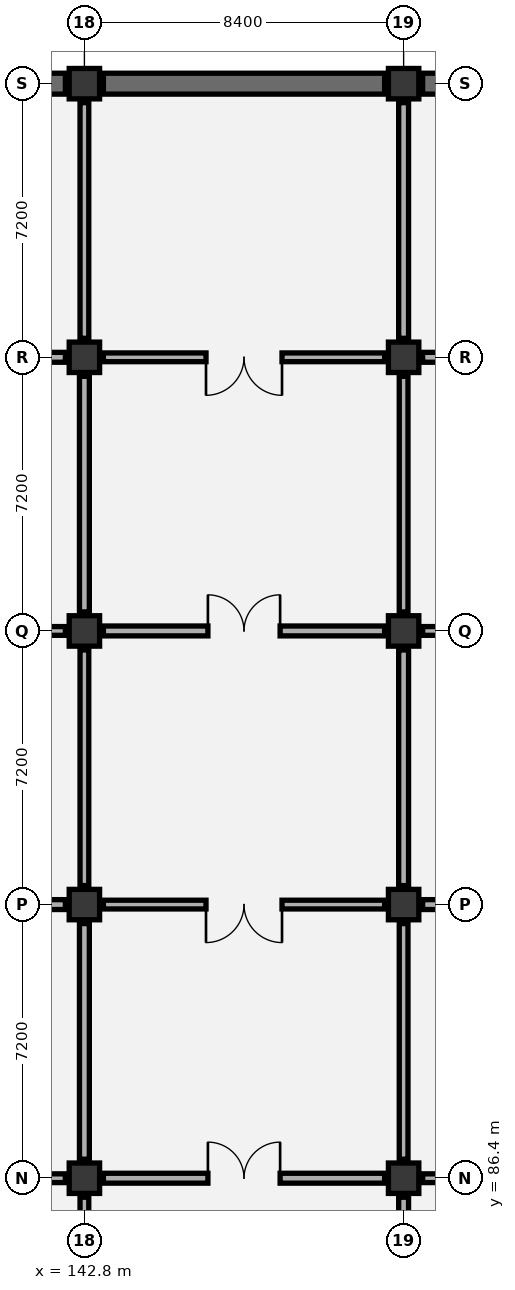
"""IFC4 building model, lengths in metres.
Left out: names, types, materials, properties, quantities, classifications, styles, units other than length and angle.
Written with IfcOpenShell. Run it as: python <this file> out.ifc"""

import sys

from ifc_helpers import new_model, si_unit, direction, frame, frame_2d, origin, origin_2d, place, context, subcontext, project, spatial, rectangle, extrude, element, fill, save


model = new_model("IFC4")
c1 = context("Model", 3, precision=1e-05, world=origin(), true_north=direction((0.0, 1.0)))
c2 = subcontext(c1, "Body", "Model", "MODEL_VIEW")
j1 = project(units=[si_unit("LENGTHUNIT", "METRE"), si_unit("PLANEANGLEUNIT", "RADIAN")], contexts=[c1])
p1 = place(None, origin())
s1 = spatial("IfcSite", under=j1, at=p1, CompositionType="ELEMENT")
p2 = place(p1, origin())
s2 = spatial("IfcBuilding", under=s1, at=p2, CompositionType="ELEMENT")
p3 = place(p2, frame((0.0, 0.0, -9.6)))
s3 = spatial("IfcBuildingStorey", under=s2, at=p3, CompositionType="ELEMENT", Elevation=-9.6)
for number, where, z_axis, x_axis in (
    (1, (142.8, 86.4, 0.0), (0.0, 0.0, 1.0), (1.0, 0.0, 0.0)),
    (2, (142.8, 93.6, 0.0), (0.0, 0.0, 1.0), (1.0, 0.0, 0.0)),
    (3, (142.8, 100.8, 0.0), (0.0, 0.0, 1.0), (1.0, 0.0, 0.0)),
    (4, (142.8, 108.0, 0.0), (0.0, 0.0, 1.0), (1.0, 0.0, 0.0)),
    (5, (142.8, 115.2, 0.0), (0.0, 0.0, 1.0), (1.0, 0.0, 0.0)),
    (6, (151.2, 86.4, 0.0), (0.0, 0.0, 1.0), (1.0, 0.0, 0.0)),
    (7, (151.2, 93.6, 0.0), (0.0, 0.0, 1.0), (1.0, 0.0, 0.0)),
    (8, (151.2, 100.8, 0.0), (0.0, 0.0, 1.0), (1.0, 0.0, 0.0)),
    (9, (151.2, 108.0, 0.0), (0.0, 0.0, 1.0), (1.0, 0.0, 0.0)),
    (10, (151.2, 115.2, 0.0), (0.0, 0.0, 1.0), (1.0, 0.0, 0.0)),
):
    element("IfcColumn", number, at=place(p3, frame(where, z_axis=z_axis, x_axis=x_axis)), inside=s3, PredefinedType="COLUMN", context=c2, shape_type="SweptSolid", body=[
        extrude(rectangle(XDim=0.8, YDim=0.8, at=origin_2d()), origin(), (0.0, 0.0, 1.0), 4.8),
    ])
p4 = place(p3, frame((134.9, 115.2, 0.0), z_axis=(0.0, 0.0, 1.0), x_axis=(1.0, 0.0, 0.0)))
e11 = element("IfcWall", 11, at=p4, inside=s3, PredefinedType="USERDEFINED", context=c2, shape_type="SweptSolid", body=[
    extrude(rectangle(XDim=7.4, YDim=0.55, at=frame_2d((3.7, 0.0))), origin(), (0.0, 0.0, 1.0), 4.4),
])
p5 = place(p3, frame((143.3, 115.2, 0.0), z_axis=(0.0, 0.0, 1.0), x_axis=(1.0, 0.0, 0.0)))
e12 = element("IfcWall", 12, at=p5, inside=s3, PredefinedType="USERDEFINED", context=c2, shape_type="SweptSolid", body=[
    extrude(rectangle(XDim=7.4, YDim=0.55, at=frame_2d((3.7, 0.0))), origin(), (0.0, 0.0, 1.0), 4.4),
])
p6 = place(p3, frame((151.7, 115.2, 0.0), z_axis=(0.0, 0.0, 1.0), x_axis=(1.0, 0.0, 0.0)))
e13 = element("IfcWall", 13, at=p6, inside=s3, PredefinedType="USERDEFINED", context=c2, shape_type="SweptSolid", body=[
    extrude(rectangle(XDim=7.4, YDim=0.55, at=frame_2d((3.7, 0.0))), origin(), (0.0, 0.0, 1.0), 4.4),
])
p7 = place(p3, frame((142.8, 79.7, 0.0), z_axis=(0.0, 0.0, 1.0), x_axis=(0.0, 1.0, 0.0)))
e14 = element("IfcWall", 14, at=p7, inside=s3, PredefinedType="PARTITIONING", context=c2, shape_type="SweptSolid", body=[
    extrude(rectangle(XDim=6.2, YDim=0.23, at=frame_2d((3.1, 0.0))), origin(), (0.0, 0.0, 1.0), 3.595),
])
p8 = place(p7, frame((2.1, 0.0, 0.0)))
e15 = element("IfcOpeningElement", 15, at=p8, cuts=e14, PredefinedType="OPENING", context=c2, shape_type="SweptSolid", body=[
    extrude(rectangle(XDim=2.0, YDim=2.35, at=frame_2d((1.0, 1.175))), frame((0.0, 0.125, 0.0), z_axis=(0.0, -1.0, 0.0), x_axis=(1.0, 0.0, 0.0)), (0.0, 0.0, 1.0), 0.25),
])
p9 = place(p3, frame((134.9, 86.4, 0.0), z_axis=(0.0, 0.0, 1.0), x_axis=(1.0, 0.0, 0.0)))
e16 = element("IfcWall", 16, at=p9, inside=s3, PredefinedType="PARTITIONING", context=c2, shape_type="SweptSolid", body=[
    extrude(rectangle(XDim=7.4, YDim=0.23, at=frame_2d((3.7, 0.0))), origin(), (0.0, 0.0, 1.0), 3.495),
])
p10 = place(p9, frame((2.75, 0.0, 0.0)))
e17 = element("IfcOpeningElement", 17, at=p10, cuts=e16, PredefinedType="OPENING", context=c2, shape_type="SweptSolid", body=[
    extrude(rectangle(XDim=1.9, YDim=2.3, at=frame_2d((0.95, 1.15))), frame((0.0, 0.125, 0.0), z_axis=(0.0, -1.0, 0.0), x_axis=(1.0, 0.0, 0.0)), (0.0, 0.0, 1.0), 0.25),
])
p11 = place(p3, frame((142.8, 86.9, 0.0), z_axis=(0.0, 0.0, 1.0), x_axis=(0.0, 1.0, 0.0)))
e18 = element("IfcWall", 18, at=p11, inside=s3, PredefinedType="PARTITIONING", context=c2, shape_type="SweptSolid", body=[
    extrude(rectangle(XDim=6.2, YDim=0.26, at=frame_2d((3.1, 0.0))), origin(), (0.0, 0.0, 1.0), 3.595),
])
p12 = place(p3, frame((134.9, 93.6, 0.0), z_axis=(0.0, 0.0, 1.0), x_axis=(1.0, 0.0, 0.0)))
e19 = element("IfcWall", 19, at=p12, inside=s3, PredefinedType="PARTITIONING", context=c2, shape_type="SweptSolid", body=[
    extrude(rectangle(XDim=7.4, YDim=0.26, at=frame_2d((3.7, 0.0))), origin(), (0.0, 0.0, 1.0), 3.495),
])
p13 = place(p12, frame((2.7, 0.0, 0.0)))
e20 = element("IfcOpeningElement", 20, at=p13, cuts=e19, PredefinedType="OPENING", context=c2, shape_type="SweptSolid", body=[
    extrude(rectangle(XDim=2.0, YDim=2.35, at=frame_2d((1.0, 1.175))), frame((0.0, 0.14, 0.0), z_axis=(0.0, -1.0, 0.0), x_axis=(1.0, 0.0, 0.0)), (0.0, 0.0, 1.0), 0.28),
])
p14 = place(p3, frame((142.8, 94.1, 0.0), z_axis=(0.0, 0.0, 1.0), x_axis=(0.0, 1.0, 0.0)))
e21 = element("IfcWall", 21, at=p14, inside=s3, PredefinedType="PARTITIONING", context=c2, shape_type="SweptSolid", body=[
    extrude(rectangle(XDim=6.2, YDim=0.23, at=frame_2d((3.1, 0.0))), origin(), (0.0, 0.0, 1.0), 3.595),
])
p15 = place(p3, frame((134.9, 100.8, 0.0), z_axis=(0.0, 0.0, 1.0), x_axis=(1.0, 0.0, 0.0)))
e22 = element("IfcWall", 22, at=p15, inside=s3, PredefinedType="PARTITIONING", context=c2, shape_type="SweptSolid", body=[
    extrude(rectangle(XDim=7.4, YDim=0.23, at=frame_2d((3.7, 0.0))), origin(), (0.0, 0.0, 1.0), 3.495),
])
p16 = place(p15, frame((2.75, 0.0, 0.0)))
e23 = element("IfcOpeningElement", 23, at=p16, cuts=e22, PredefinedType="OPENING", context=c2, shape_type="SweptSolid", body=[
    extrude(rectangle(XDim=1.9, YDim=2.3, at=frame_2d((0.95, 1.15))), frame((0.0, 0.125, 0.0), z_axis=(0.0, -1.0, 0.0), x_axis=(1.0, 0.0, 0.0)), (0.0, 0.0, 1.0), 0.25),
])
p17 = place(p3, frame((142.8, 101.3, 0.0), z_axis=(0.0, 0.0, 1.0), x_axis=(0.0, 1.0, 0.0)))
e24 = element("IfcWall", 24, at=p17, inside=s3, PredefinedType="PARTITIONING", context=c2, shape_type="SweptSolid", body=[
    extrude(rectangle(XDim=6.2, YDim=0.26, at=frame_2d((3.1, 0.0))), origin(), (0.0, 0.0, 1.0), 3.595),
])
p18 = place(p3, frame((134.9, 108.0, 0.0), z_axis=(0.0, 0.0, 1.0), x_axis=(1.0, 0.0, 0.0)))
e25 = element("IfcWall", 25, at=p18, inside=s3, PredefinedType="PARTITIONING", context=c2, shape_type="SweptSolid", body=[
    extrude(rectangle(XDim=7.4, YDim=0.26, at=frame_2d((3.7, 0.0))), origin(), (0.0, 0.0, 1.0), 3.495),
])
p19 = place(p18, frame((2.7, 0.0, 0.0)))
e26 = element("IfcOpeningElement", 26, at=p19, cuts=e25, PredefinedType="OPENING", context=c2, shape_type="SweptSolid", body=[
    extrude(rectangle(XDim=2.0, YDim=2.35, at=frame_2d((1.0, 1.175))), frame((0.0, 0.14, 0.0), z_axis=(0.0, -1.0, 0.0), x_axis=(1.0, 0.0, 0.0)), (0.0, 0.0, 1.0), 0.28),
])
p20 = place(p3, frame((142.8, 108.5, 0.0), z_axis=(0.0, 0.0, 1.0), x_axis=(0.0, 1.0, 0.0)))
e27 = element("IfcWall", 27, at=p20, inside=s3, PredefinedType="PARTITIONING", context=c2, shape_type="SweptSolid", body=[
    extrude(rectangle(XDim=6.2, YDim=0.23, at=frame_2d((3.1, 0.0))), origin(), (0.0, 0.0, 1.0), 3.595),
])
p21 = place(p3, frame((151.2, 79.7, 0.0), z_axis=(0.0, 0.0, 1.0), x_axis=(0.0, 1.0, 0.0)))
e28 = element("IfcWall", 28, at=p21, inside=s3, PredefinedType="PARTITIONING", context=c2, shape_type="SweptSolid", body=[
    extrude(rectangle(XDim=6.2, YDim=0.26, at=frame_2d((3.1, 0.0))), origin(), (0.0, 0.0, 1.0), 3.595),
])
p22 = place(p21, frame((2.1, 0.0, 0.0)))
e29 = element("IfcOpeningElement", 29, at=p22, cuts=e28, PredefinedType="OPENING", context=c2, shape_type="SweptSolid", body=[
    extrude(rectangle(XDim=2.0, YDim=2.35, at=frame_2d((1.0, 1.175))), frame((0.0, 0.14, 0.0), z_axis=(0.0, -1.0, 0.0), x_axis=(1.0, 0.0, 0.0)), (0.0, 0.0, 1.0), 0.28),
])
p23 = place(p3, frame((143.3, 86.4, 0.0), z_axis=(0.0, 0.0, 1.0), x_axis=(1.0, 0.0, 0.0)))
e30 = element("IfcWall", 30, at=p23, inside=s3, PredefinedType="PARTITIONING", context=c2, shape_type="SweptSolid", body=[
    extrude(rectangle(XDim=7.4, YDim=0.26, at=frame_2d((3.7, 0.0))), origin(), (0.0, 0.0, 1.0), 3.495),
])
p24 = place(p23, frame((2.75, 0.0, 0.0)))
e31 = element("IfcOpeningElement", 31, at=p24, cuts=e30, PredefinedType="OPENING", context=c2, shape_type="SweptSolid", body=[
    extrude(rectangle(XDim=1.9, YDim=2.3, at=frame_2d((0.95, 1.15))), frame((0.0, 0.14, 0.0), z_axis=(0.0, -1.0, 0.0), x_axis=(1.0, 0.0, 0.0)), (0.0, 0.0, 1.0), 0.28),
])
p25 = place(p3, frame((151.2, 86.9, 0.0), z_axis=(0.0, 0.0, 1.0), x_axis=(0.0, 1.0, 0.0)))
e32 = element("IfcWall", 32, at=p25, inside=s3, PredefinedType="PARTITIONING", context=c2, shape_type="SweptSolid", body=[
    extrude(rectangle(XDim=6.2, YDim=0.23, at=frame_2d((3.1, 0.0))), origin(), (0.0, 0.0, 1.0), 3.595),
])
p26 = place(p3, frame((143.3, 93.6, 0.0), z_axis=(0.0, 0.0, 1.0), x_axis=(1.0, 0.0, 0.0)))
e33 = element("IfcWall", 33, at=p26, inside=s3, PredefinedType="PARTITIONING", context=c2, shape_type="SweptSolid", body=[
    extrude(rectangle(XDim=7.4, YDim=0.23, at=frame_2d((3.7, 0.0))), origin(), (0.0, 0.0, 1.0), 3.495),
])
p27 = place(p26, frame((2.7, 0.0, 0.0)))
e34 = element("IfcOpeningElement", 34, at=p27, cuts=e33, PredefinedType="OPENING", context=c2, shape_type="SweptSolid", body=[
    extrude(rectangle(XDim=2.0, YDim=2.35, at=frame_2d((1.0, 1.175))), frame((0.0, 0.125, 0.0), z_axis=(0.0, -1.0, 0.0), x_axis=(1.0, 0.0, 0.0)), (0.0, 0.0, 1.0), 0.25),
])
p28 = place(p3, frame((151.2, 94.1, 0.0), z_axis=(0.0, 0.0, 1.0), x_axis=(0.0, 1.0, 0.0)))
e35 = element("IfcWall", 35, at=p28, inside=s3, PredefinedType="PARTITIONING", context=c2, shape_type="SweptSolid", body=[
    extrude(rectangle(XDim=6.2, YDim=0.26, at=frame_2d((3.1, 0.0))), origin(), (0.0, 0.0, 1.0), 3.595),
])
p29 = place(p3, frame((143.3, 100.8, 0.0), z_axis=(0.0, 0.0, 1.0), x_axis=(1.0, 0.0, 0.0)))
e36 = element("IfcWall", 36, at=p29, inside=s3, PredefinedType="PARTITIONING", context=c2, shape_type="SweptSolid", body=[
    extrude(rectangle(XDim=7.4, YDim=0.26, at=frame_2d((3.7, 0.0))), origin(), (0.0, 0.0, 1.0), 3.495),
])
p30 = place(p29, frame((2.75, 0.0, 0.0)))
e37 = element("IfcOpeningElement", 37, at=p30, cuts=e36, PredefinedType="OPENING", context=c2, shape_type="SweptSolid", body=[
    extrude(rectangle(XDim=1.9, YDim=2.3, at=frame_2d((0.95, 1.15))), frame((0.0, 0.14, 0.0), z_axis=(0.0, -1.0, 0.0), x_axis=(1.0, 0.0, 0.0)), (0.0, 0.0, 1.0), 0.28),
])
p31 = place(p3, frame((151.2, 101.3, 0.0), z_axis=(0.0, 0.0, 1.0), x_axis=(0.0, 1.0, 0.0)))
e38 = element("IfcWall", 38, at=p31, inside=s3, PredefinedType="PARTITIONING", context=c2, shape_type="SweptSolid", body=[
    extrude(rectangle(XDim=6.2, YDim=0.23, at=frame_2d((3.1, 0.0))), origin(), (0.0, 0.0, 1.0), 3.595),
])
p32 = place(p3, frame((143.3, 108.0, 0.0), z_axis=(0.0, 0.0, 1.0), x_axis=(1.0, 0.0, 0.0)))
e39 = element("IfcWall", 39, at=p32, inside=s3, PredefinedType="PARTITIONING", context=c2, shape_type="SweptSolid", body=[
    extrude(rectangle(XDim=7.4, YDim=0.23, at=frame_2d((3.7, 0.0))), origin(), (0.0, 0.0, 1.0), 3.495),
])
p33 = place(p32, frame((2.7, 0.0, 0.0)))
e40 = element("IfcOpeningElement", 40, at=p33, cuts=e39, PredefinedType="OPENING", context=c2, shape_type="SweptSolid", body=[
    extrude(rectangle(XDim=2.0, YDim=2.35, at=frame_2d((1.0, 1.175))), frame((0.0, 0.125, 0.0), z_axis=(0.0, -1.0, 0.0), x_axis=(1.0, 0.0, 0.0)), (0.0, 0.0, 1.0), 0.25),
])
p34 = place(p3, frame((151.2, 108.5, 0.0), z_axis=(0.0, 0.0, 1.0), x_axis=(0.0, 1.0, 0.0)))
e41 = element("IfcWall", 41, at=p34, inside=s3, PredefinedType="PARTITIONING", context=c2, shape_type="SweptSolid", body=[
    extrude(rectangle(XDim=6.2, YDim=0.26, at=frame_2d((3.1, 0.0))), origin(), (0.0, 0.0, 1.0), 3.595),
])
p35 = place(p3, frame((151.7, 86.4, 0.0), z_axis=(0.0, 0.0, 1.0), x_axis=(1.0, 0.0, 0.0)))
e42 = element("IfcWall", 42, at=p35, inside=s3, PredefinedType="PARTITIONING", context=c2, shape_type="SweptSolid", body=[
    extrude(rectangle(XDim=7.4, YDim=0.23, at=frame_2d((3.7, 0.0))), origin(), (0.0, 0.0, 1.0), 3.495),
])
p36 = place(p35, frame((2.75, 0.0, 0.0)))
e43 = element("IfcOpeningElement", 43, at=p36, cuts=e42, PredefinedType="OPENING", context=c2, shape_type="SweptSolid", body=[
    extrude(rectangle(XDim=1.9, YDim=2.3, at=frame_2d((0.95, 1.15))), frame((0.0, 0.125, 0.0), z_axis=(0.0, -1.0, 0.0), x_axis=(1.0, 0.0, 0.0)), (0.0, 0.0, 1.0), 0.25),
])
p37 = place(p3, frame((151.7, 93.6, 0.0), z_axis=(0.0, 0.0, 1.0), x_axis=(1.0, 0.0, 0.0)))
e44 = element("IfcWall", 44, at=p37, inside=s3, PredefinedType="PARTITIONING", context=c2, shape_type="SweptSolid", body=[
    extrude(rectangle(XDim=7.4, YDim=0.26, at=frame_2d((3.7, 0.0))), origin(), (0.0, 0.0, 1.0), 3.495),
])
p38 = place(p37, frame((2.7, 0.0, 0.0)))
e45 = element("IfcOpeningElement", 45, at=p38, cuts=e44, PredefinedType="OPENING", context=c2, shape_type="SweptSolid", body=[
    extrude(rectangle(XDim=2.0, YDim=2.35, at=frame_2d((1.0, 1.175))), frame((0.0, 0.14, 0.0), z_axis=(0.0, -1.0, 0.0), x_axis=(1.0, 0.0, 0.0)), (0.0, 0.0, 1.0), 0.28),
])
p39 = place(p3, frame((151.7, 100.8, 0.0), z_axis=(0.0, 0.0, 1.0), x_axis=(1.0, 0.0, 0.0)))
e46 = element("IfcWall", 46, at=p39, inside=s3, PredefinedType="PARTITIONING", context=c2, shape_type="SweptSolid", body=[
    extrude(rectangle(XDim=7.4, YDim=0.23, at=frame_2d((3.7, 0.0))), origin(), (0.0, 0.0, 1.0), 3.495),
])
p40 = place(p39, frame((2.75, 0.0, 0.0)))
e47 = element("IfcOpeningElement", 47, at=p40, cuts=e46, PredefinedType="OPENING", context=c2, shape_type="SweptSolid", body=[
    extrude(rectangle(XDim=1.9, YDim=2.3, at=frame_2d((0.95, 1.15))), frame((0.0, 0.125, 0.0), z_axis=(0.0, -1.0, 0.0), x_axis=(1.0, 0.0, 0.0)), (0.0, 0.0, 1.0), 0.25),
])
p41 = place(p3, frame((151.7, 108.0, 0.0), z_axis=(0.0, 0.0, 1.0), x_axis=(1.0, 0.0, 0.0)))
e48 = element("IfcWall", 48, at=p41, inside=s3, PredefinedType="PARTITIONING", context=c2, shape_type="SweptSolid", body=[
    extrude(rectangle(XDim=7.4, YDim=0.26, at=frame_2d((3.7, 0.0))), origin(), (0.0, 0.0, 1.0), 3.495),
])
p42 = place(p41, frame((2.7, 0.0, 0.0)))
e49 = element("IfcOpeningElement", 49, at=p42, cuts=e48, PredefinedType="OPENING", context=c2, shape_type="SweptSolid", body=[
    extrude(rectangle(XDim=2.0, YDim=2.35, at=frame_2d((1.0, 1.175))), frame((0.0, 0.14, 0.0), z_axis=(0.0, -1.0, 0.0), x_axis=(1.0, 0.0, 0.0)), (0.0, 0.0, 1.0), 0.28),
])
p43 = place(p24, origin())
e50 = element("IfcDoor", 50, at=p43, inside=s3, OperationType="DOUBLE_DOOR_SINGLE_SWING", PredefinedType="DOOR", context=c2, shape_type="SweptSolid", body=[
    extrude(rectangle(XDim=1.9, YDim=2.3, at=frame_2d((0.95, 1.15))), frame((0.0, 0.025, 0.0), z_axis=(0.0, -1.0, 0.0), x_axis=(1.0, 0.0, 0.0)), (0.0, 0.0, 1.0), 0.05),
])
fill(e31, e50)
p44 = place(p27, frame((2.0, 0.0, 0.0), z_axis=(0.0, 0.0, 1.0), x_axis=(-1.0, 0.0, 0.0)))
e51 = element("IfcDoor", 51, at=p44, inside=s3, OperationType="DOUBLE_DOOR_SINGLE_SWING", PredefinedType="DOOR", context=c2, shape_type="SweptSolid", body=[
    extrude(rectangle(XDim=2.0, YDim=2.35, at=frame_2d((1.0, 1.175))), frame((0.0, 0.025, 0.0), z_axis=(0.0, -1.0, 0.0), x_axis=(1.0, 0.0, 0.0)), (0.0, 0.0, 1.0), 0.05),
])
fill(e34, e51)
p45 = place(p30, origin())
e52 = element("IfcDoor", 52, at=p45, inside=s3, OperationType="DOUBLE_DOOR_SINGLE_SWING", PredefinedType="DOOR", context=c2, shape_type="SweptSolid", body=[
    extrude(rectangle(XDim=1.9, YDim=2.3, at=frame_2d((0.95, 1.15))), frame((0.0, 0.025, 0.0), z_axis=(0.0, -1.0, 0.0), x_axis=(1.0, 0.0, 0.0)), (0.0, 0.0, 1.0), 0.05),
])
fill(e37, e52)
p46 = place(p33, frame((2.0, 0.0, 0.0), z_axis=(0.0, 0.0, 1.0), x_axis=(-1.0, 0.0, 0.0)))
e53 = element("IfcDoor", 53, at=p46, inside=s3, OperationType="DOUBLE_DOOR_SINGLE_SWING", PredefinedType="DOOR", context=c2, shape_type="SweptSolid", body=[
    extrude(rectangle(XDim=2.0, YDim=2.35, at=frame_2d((1.0, 1.175))), frame((0.0, 0.025, 0.0), z_axis=(0.0, -1.0, 0.0), x_axis=(1.0, 0.0, 0.0)), (0.0, 0.0, 1.0), 0.05),
])
fill(e40, e53)
save(model, sys.argv[1])
